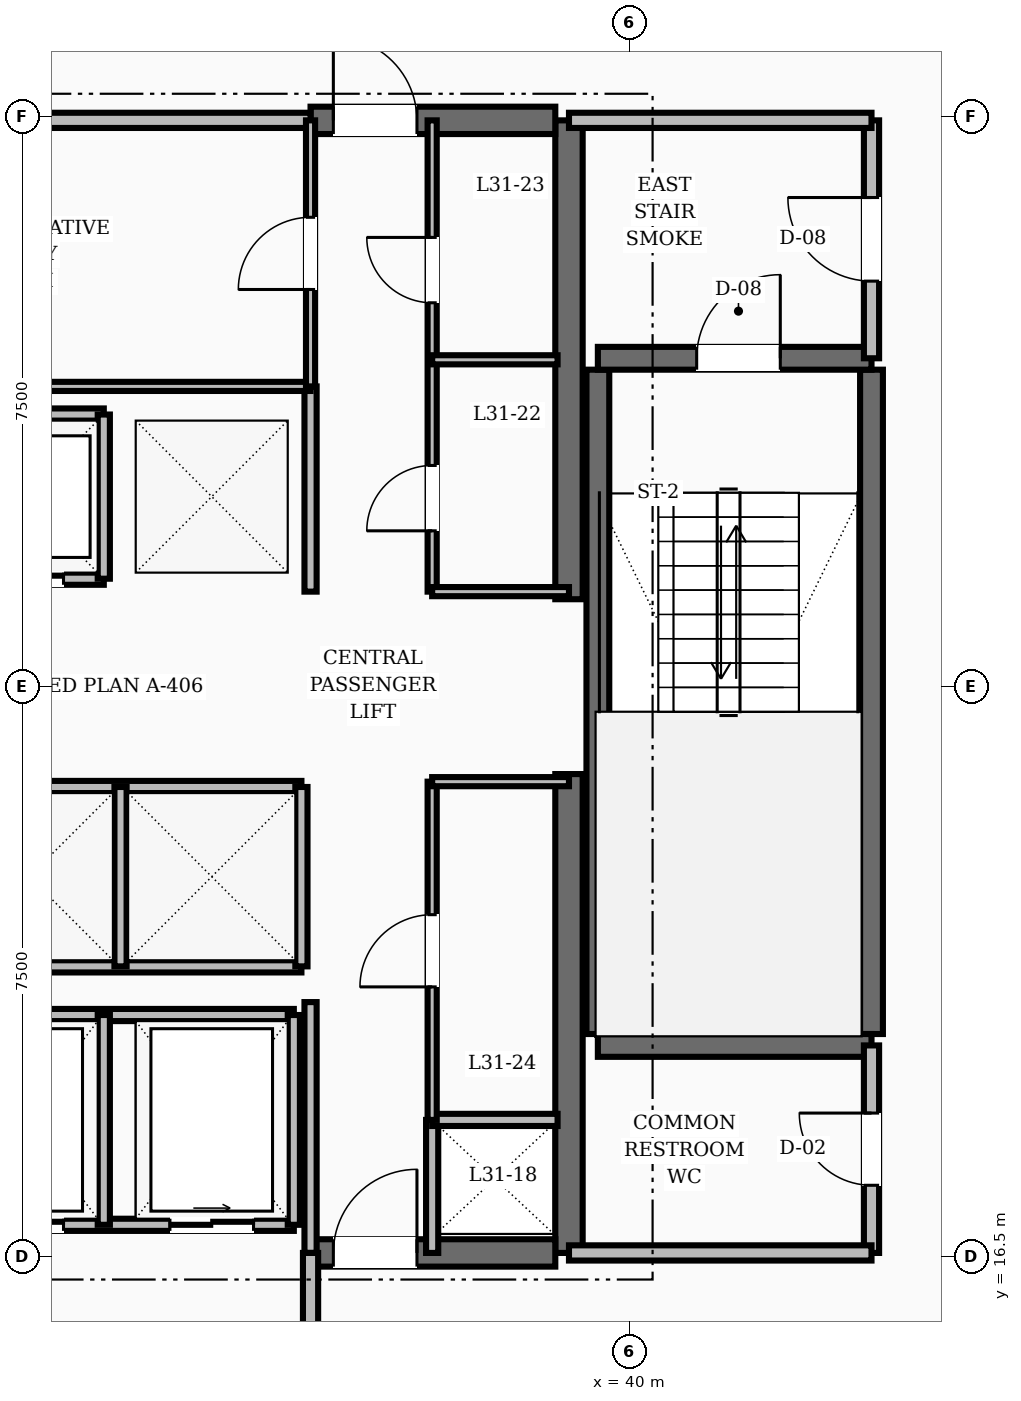
"""IFC4 building model, lengths in metres.
Left out: names, types, materials, properties, quantities, classifications, styles, units other than length and angle.
Written with IfcOpenShell. Run it as: python <this file> out.ifc"""

import sys

from ifc_helpers import new_model, si_unit, direction, frame, frame_2d, origin, place, context, subcontext, project, spatial, rectangle, extrude, element, fill, save


model = new_model("IFC4")
c1 = context("Model", 3, precision=1e-05, world=origin(), true_north=direction((0.0, 1.0)))
c2 = subcontext(c1, "Body", "Model", "MODEL_VIEW")
j1 = project(units=[si_unit("LENGTHUNIT", "METRE"), si_unit("PLANEANGLEUNIT", "RADIAN")], contexts=[c1])
p1 = place(None, origin())
s1 = spatial("IfcSite", under=j1, at=p1, CompositionType="ELEMENT")
p2 = place(p1, origin())
s2 = spatial("IfcBuilding", under=s1, at=p2, CompositionType="ELEMENT")
p3 = place(p2, frame((0.0, 0.0, 124.4)))
s3 = spatial("IfcBuildingStorey", under=s2, at=p3, CompositionType="ELEMENT", Elevation=124.4)
for number, where, z_axis, x_axis in (
    (1, (39.2, 16.55, 0.0), (0.0, 0.0, 1.0), (0.0, 1.0, 0.0)),
    (2, (39.2, 25.15, 0.0), (0.0, 0.0, 1.0), (0.0, 1.0, 0.0)),
):
    element("IfcWall", number, at=place(p3, frame(where, z_axis=z_axis, x_axis=x_axis)), inside=s3, PredefinedType="SHEAR", context=c2, shape_type="SweptSolid", body=[
        extrude(rectangle(XDim=6.3, YDim=0.36, at=frame_2d((3.15, 0.0))), origin(), (0.0, 0.0, 1.0), 3.6),
    ])
p4 = place(p3, frame((35.8, 16.55, 0.0), z_axis=(0.0, 0.0, 1.0), x_axis=(1.0, 0.0, 0.0)))
e3 = element("IfcWall", 3, at=p4, inside=s3, PredefinedType="SHEAR", context=c2, shape_type="SweptSolid", body=[
    extrude(rectangle(XDim=3.22, YDim=0.36, at=frame_2d((1.61, 0.0))), origin(), (0.0, 0.0, 1.0), 3.6),
])
p5 = place(p4, frame((0.3, 0.0, 0.0)))
e4 = element("IfcOpeningElement", 4, at=p5, cuts=e3, PredefinedType="OPENING", context=c2, shape_type="SweptSolid", body=[
    extrude(rectangle(XDim=1.1, YDim=2.1, at=frame_2d((0.55, 1.05))), frame((0.0, 0.19, 0.0), z_axis=(0.0, -1.0, 0.0), x_axis=(1.0, 0.0, 0.0)), (0.0, 0.0, 1.0), 0.38),
])
p6 = place(p3, frame((35.8, 31.45, 0.0), z_axis=(0.0, 0.0, 1.0), x_axis=(1.0, 0.0, 0.0)))
e5 = element("IfcWall", 5, at=p6, inside=s3, PredefinedType="SHEAR", context=c2, shape_type="SweptSolid", body=[
    extrude(rectangle(XDim=3.22, YDim=0.36, at=frame_2d((1.61, 0.0))), origin(), (0.0, 0.0, 1.0), 3.6),
])
p7 = place(p6, frame((0.3, 0.0, 0.0)))
e6 = element("IfcOpeningElement", 6, at=p7, cuts=e5, PredefinedType="OPENING", context=c2, shape_type="SweptSolid", body=[
    extrude(rectangle(XDim=1.1, YDim=2.1, at=frame_2d((0.55, 1.05))), frame((0.0, 0.19, 0.0), z_axis=(0.0, -1.0, 0.0), x_axis=(1.0, 0.0, 0.0)), (0.0, 0.0, 1.0), 0.38),
])
for number, where, z_axis, x_axis in (
    (7, (43.18, 19.43, 0.0), (0.0, 0.0, 1.0), (0.0, 1.0, 0.0)),
    (8, (39.58, 19.43, 0.0), (0.0, 0.0, 1.0), (0.0, 1.0, 0.0)),
):
    element("IfcWall", number, at=place(p3, frame(where, z_axis=z_axis, x_axis=x_axis)), inside=s3, PredefinedType="SHEAR", context=c2, shape_type="SweptSolid", body=[
        extrude(rectangle(XDim=8.74, YDim=0.3, at=frame_2d((4.37, 0.0))), origin(), (0.0, 0.0, 1.0), 3.6),
    ])
p8 = place(p3, frame((39.58, 19.28, 0.0), z_axis=(0.0, 0.0, 1.0), x_axis=(1.0, 0.0, 0.0)))
e9 = element("IfcWall", 9, at=p8, inside=s3, PredefinedType="SHEAR", context=c2, shape_type="SweptSolid", body=[
    extrude(rectangle(XDim=3.6, YDim=0.3, at=frame_2d((1.8, 0.0))), origin(), (0.0, 0.0, 1.0), 3.6),
])
p9 = place(p3, frame((39.58, 28.32, 0.0), z_axis=(0.0, 0.0, 1.0), x_axis=(1.0, 0.0, 0.0)))
e10 = element("IfcWall", 10, at=p9, inside=s3, PredefinedType="SHEAR", context=c2, shape_type="SweptSolid", body=[
    extrude(rectangle(XDim=3.6, YDim=0.3, at=frame_2d((1.8, 0.0))), origin(), (0.0, 0.0, 1.0), 3.6),
])
p10 = place(p9, frame((1.3, 0.0, 0.0)))
e11 = element("IfcOpeningElement", 11, at=p10, cuts=e10, PredefinedType="OPENING", context=c2, shape_type="SweptSolid", body=[
    extrude(rectangle(XDim=1.1, YDim=2.1, at=frame_2d((0.55, 1.05))), frame((0.0, 0.16, 0.0), z_axis=(0.0, -1.0, 0.0), x_axis=(1.0, 0.0, 0.0)), (0.0, 0.0, 1.0), 0.32),
])
p11 = place(p3, frame((43.18, 28.32, 0.0), z_axis=(0.0, 0.0, 1.0), x_axis=(0.0, 1.0, 0.0)))
e12 = element("IfcWall", 12, at=p11, inside=s3, PredefinedType="SOLIDWALL", context=c2, shape_type="SweptSolid", body=[
    extrude(rectangle(XDim=3.13, YDim=0.2, at=frame_2d((1.565, 0.0))), origin(), (0.0, 0.0, 1.0), 2.8),
])
p12 = place(p11, frame((1.015, 0.0, 0.0)))
e13 = element("IfcOpeningElement", 13, at=p12, cuts=e12, PredefinedType="OPENING", context=c2, shape_type="SweptSolid", body=[
    extrude(rectangle(XDim=1.1, YDim=2.1, at=frame_2d((0.55, 1.05))), frame((0.0, 0.11, 0.0), z_axis=(0.0, -1.0, 0.0), x_axis=(1.0, 0.0, 0.0)), (0.0, 0.0, 1.0), 0.22),
])
p13 = place(p3, frame((39.2, 31.45, 0.0), z_axis=(0.0, 0.0, 1.0), x_axis=(1.0, 0.0, 0.0)))
e14 = element("IfcWall", 14, at=p13, inside=s3, PredefinedType="SOLIDWALL", context=c2, shape_type="SweptSolid", body=[
    extrude(rectangle(XDim=3.98, YDim=0.2, at=frame_2d((1.99, 0.0))), origin(), (0.0, 0.0, 1.0), 2.8),
])
p14 = place(p3, frame((43.18, 16.55, 0.0), z_axis=(0.0, 0.0, 1.0), x_axis=(0.0, 1.0, 0.0)))
e15 = element("IfcWall", 15, at=p14, inside=s3, PredefinedType="SOLIDWALL", context=c2, shape_type="SweptSolid", body=[
    extrude(rectangle(XDim=2.73, YDim=0.2, at=frame_2d((1.365, 0.0))), origin(), (0.0, 0.0, 1.0), 2.8),
])
p15 = place(p14, frame((0.89, 0.0, 0.0)))
e16 = element("IfcOpeningElement", 16, at=p15, cuts=e15, PredefinedType="OPENING", context=c2, shape_type="SweptSolid", body=[
    extrude(rectangle(XDim=0.95, YDim=2.1, at=frame_2d((0.475, 1.05))), frame((0.0, 0.11, 0.0), z_axis=(0.0, -1.0, 0.0), x_axis=(1.0, 0.0, 0.0)), (0.0, 0.0, 1.0), 0.22),
])
p16 = place(p3, frame((39.2, 16.55, 0.0), z_axis=(0.0, 0.0, 1.0), x_axis=(1.0, 0.0, 0.0)))
e17 = element("IfcWall", 17, at=p16, inside=s3, PredefinedType="SOLIDWALL", context=c2, shape_type="SweptSolid", body=[
    extrude(rectangle(XDim=3.98, YDim=0.2, at=frame_2d((1.99, 0.0))), origin(), (0.0, 0.0, 1.0), 2.8),
])
p17 = place(p3, frame((35.8, 16.55, 0.0), z_axis=(0.0, 0.0, 1.0), x_axis=(0.0, 1.0, 0.0)))
e18 = element("IfcWall", 18, at=p17, inside=s3, PredefinedType="SOLIDWALL", context=c2, shape_type="SweptSolid", body=[
    extrude(rectangle(XDim=3.3, YDim=0.16, at=frame_2d((1.65, 0.0))), origin(), (0.0, 0.0, 1.0), 2.8),
])
p18 = place(p3, frame((37.4, 16.55, 0.0), z_axis=(0.0, 0.0, 1.0), x_axis=(0.0, 1.0, 0.0)))
e19 = element("IfcWall", 19, at=p18, inside=s3, PredefinedType="SOLIDWALL", context=c2, shape_type="SweptSolid", body=[
    extrude(rectangle(XDim=1.75, YDim=0.16, at=frame_2d((0.875, 0.0))), origin(), (0.0, 0.0, 1.0), 2.8),
])
p19 = place(p3, frame((35.8, 25.25, 0.0), z_axis=(0.0, 0.0, 1.0), x_axis=(0.0, 1.0, 0.0)))
e20 = element("IfcWall", 20, at=p19, inside=s3, PredefinedType="SOLIDWALL", context=c2, shape_type="SweptSolid", body=[
    extrude(rectangle(XDim=2.7, YDim=0.16, at=frame_2d((1.35, 0.0))), origin(), (0.0, 0.0, 1.0), 2.8),
])
p20 = place(p3, frame((35.8, 14.35, 0.0), z_axis=(0.0, 0.0, 1.0), x_axis=(0.0, 1.0, 0.0)))
e21 = element("IfcWall", 21, at=p20, inside=s3, PredefinedType="SOLIDWALL", context=c2, shape_type="SweptSolid", body=[
    extrude(rectangle(XDim=2.2, YDim=0.2, at=frame_2d((1.1, 0.0))), origin(), (0.0, 0.0, 1.0), 2.8),
])
p21 = place(p3, frame((28.42, 25.42, 0.0), z_axis=(0.0, 0.0, 1.0), x_axis=(1.0, 0.0, 0.0)))
e22 = element("IfcWall", 22, at=p21, inside=s3, PredefinedType="SOLIDWALL", context=c2, shape_type="SweptSolid", body=[
    extrude(rectangle(XDim=4.66, YDim=0.16, at=frame_2d((2.33, 0.0))), origin(), (0.0, 0.0, 1.0), 2.8),
])
p22 = place(p21, frame((0.53, 0.0, 0.0)))
e23 = element("IfcOpeningElement", 23, at=p22, cuts=e22, PredefinedType="OPENING", context=c2, shape_type="SweptSolid", body=[
    extrude(rectangle(XDim=1.1, YDim=2.15, at=frame_2d((0.55, 1.075))), frame((0.0, 0.09, 0.0), z_axis=(0.0, -1.0, 0.0), x_axis=(1.0, 0.0, 0.0)), (0.0, 0.0, 1.0), 0.18),
])
p23 = place(p21, frame((3.03, 0.0, 0.0)))
e24 = element("IfcOpeningElement", 24, at=p23, cuts=e22, PredefinedType="OPENING", context=c2, shape_type="SweptSolid", body=[
    extrude(rectangle(XDim=1.1, YDim=2.15, at=frame_2d((0.55, 1.075))), frame((0.0, 0.09, 0.0), z_axis=(0.0, -1.0, 0.0), x_axis=(1.0, 0.0, 0.0)), (0.0, 0.0, 1.0), 0.18),
])
p24 = place(p3, frame((28.42, 27.58, 0.0), z_axis=(0.0, 0.0, 1.0), x_axis=(1.0, 0.0, 0.0)))
e25 = element("IfcWall", 25, at=p24, inside=s3, PredefinedType="SOLIDWALL", context=c2, shape_type="SweptSolid", body=[
    extrude(rectangle(XDim=4.66, YDim=0.16, at=frame_2d((2.33, 0.0))), origin(), (0.0, 0.0, 1.0), 2.8),
])
p25 = place(p3, frame((33.08, 25.42, 0.0), z_axis=(0.0, 0.0, 1.0), x_axis=(0.0, 1.0, 0.0)))
e26 = element("IfcWall", 26, at=p25, inside=s3, PredefinedType="SOLIDWALL", context=c2, shape_type="SweptSolid", body=[
    extrude(rectangle(XDim=2.16, YDim=0.16, at=frame_2d((1.08, 0.0))), origin(), (0.0, 0.0, 1.0), 2.8),
])
for number, where, z_axis, x_axis in (
    (27, (30.92, 22.68, 0.0), (0.0, 0.0, 1.0), (1.0, 0.0, 0.0)),
    (28, (30.92, 20.32, 0.0), (0.0, 0.0, 1.0), (1.0, 0.0, 0.0)),
):
    element("IfcWall", number, at=place(p3, frame(where, z_axis=z_axis, x_axis=x_axis)), inside=s3, PredefinedType="SOLIDWALL", context=c2, shape_type="SweptSolid", body=[
        extrude(rectangle(XDim=4.76, YDim=0.16, at=frame_2d((2.38, 0.0))), origin(), (0.0, 0.0, 1.0), 2.8),
    ])
for number, where, z_axis, x_axis in (
    (29, (33.3, 20.32, 0.0), (0.0, 0.0, 1.0), (0.0, 1.0, 0.0)),
    (30, (35.68, 20.32, 0.0), (0.0, 0.0, 1.0), (0.0, 1.0, 0.0)),
):
    element("IfcWall", number, at=place(p3, frame(where, z_axis=z_axis, x_axis=x_axis)), inside=s3, PredefinedType="SOLIDWALL", context=c2, shape_type="SweptSolid", body=[
        extrude(rectangle(XDim=2.36, YDim=0.16, at=frame_2d((1.18, 0.0))), origin(), (0.0, 0.0, 1.0), 2.8),
    ])
p26 = place(p3, frame((28.42, 16.92, 0.0), z_axis=(0.0, 0.0, 1.0), x_axis=(1.0, 0.0, 0.0)))
e31 = element("IfcWall", 31, at=p26, inside=s3, PredefinedType="SOLIDWALL", context=c2, shape_type="SweptSolid", body=[
    extrude(rectangle(XDim=7.16, YDim=0.16, at=frame_2d((3.58, 0.0))), origin(), (0.0, 0.0, 1.0), 2.8),
])
p27 = place(p26, frame((0.53, 0.0, 0.0)))
e32 = element("IfcOpeningElement", 32, at=p27, cuts=e31, PredefinedType="OPENING", context=c2, shape_type="SweptSolid", body=[
    extrude(rectangle(XDim=1.1, YDim=2.15, at=frame_2d((0.55, 1.075))), frame((0.0, 0.09, 0.0), z_axis=(0.0, -1.0, 0.0), x_axis=(1.0, 0.0, 0.0)), (0.0, 0.0, 1.0), 0.18),
])
p28 = place(p26, frame((3.03, 0.0, 0.0)))
e33 = element("IfcOpeningElement", 33, at=p28, cuts=e31, PredefinedType="OPENING", context=c2, shape_type="SweptSolid", body=[
    extrude(rectangle(XDim=1.1, YDim=2.15, at=frame_2d((0.55, 1.075))), frame((0.0, 0.09, 0.0), z_axis=(0.0, -1.0, 0.0), x_axis=(1.0, 0.0, 0.0)), (0.0, 0.0, 1.0), 0.18),
])
p29 = place(p26, frame((5.53, 0.0, 0.0)))
e34 = element("IfcOpeningElement", 34, at=p29, cuts=e31, PredefinedType="OPENING", context=c2, shape_type="SweptSolid", body=[
    extrude(rectangle(XDim=1.1, YDim=2.15, at=frame_2d((0.55, 1.075))), frame((0.0, 0.09, 0.0), z_axis=(0.0, -1.0, 0.0), x_axis=(1.0, 0.0, 0.0)), (0.0, 0.0, 1.0), 0.18),
])
p30 = place(p3, frame((28.42, 19.68, 0.0), z_axis=(0.0, 0.0, 1.0), x_axis=(1.0, 0.0, 0.0)))
e35 = element("IfcWall", 35, at=p30, inside=s3, PredefinedType="SOLIDWALL", context=c2, shape_type="SweptSolid", body=[
    extrude(rectangle(XDim=7.16, YDim=0.16, at=frame_2d((3.58, 0.0))), origin(), (0.0, 0.0, 1.0), 2.8),
])
for number, where, z_axis, x_axis in (
    (36, (33.08, 16.92, 0.0), (0.0, 0.0, 1.0), (0.0, 1.0, 0.0)),
    (37, (35.58, 16.92, 0.0), (0.0, 0.0, 1.0), (0.0, 1.0, 0.0)),
):
    element("IfcWall", number, at=place(p3, frame(where, z_axis=z_axis, x_axis=x_axis)), inside=s3, PredefinedType="SOLIDWALL", context=c2, shape_type="SweptSolid", body=[
        extrude(rectangle(XDim=2.76, YDim=0.16, at=frame_2d((1.38, 0.0))), origin(), (0.0, 0.0, 1.0), 2.8),
    ])
p31 = place(p3, frame((28.2, 31.45, 0.0), z_axis=(0.0, 0.0, 1.0), x_axis=(1.0, 0.0, 0.0)))
e38 = element("IfcWall", 38, at=p31, inside=s3, PredefinedType="SOLIDWALL", context=c2, shape_type="SweptSolid", body=[
    extrude(rectangle(XDim=7.6, YDim=0.2, at=frame_2d((3.8, 0.0))), origin(), (0.0, 0.0, 1.0), 2.8),
])
p32 = place(p3, frame((28.2, 27.95, 0.0), z_axis=(0.0, 0.0, 1.0), x_axis=(1.0, 0.0, 0.0)))
e39 = element("IfcWall", 39, at=p32, inside=s3, PredefinedType="PARTITIONING", context=c2, shape_type="SweptSolid", body=[
    extrude(rectangle(XDim=7.6, YDim=0.12, at=frame_2d((3.8, 0.0))), origin(), (0.0, 0.0, 1.0), 2.8),
])
p33 = place(p3, frame((35.8, 27.95, 0.0), z_axis=(0.0, 0.0, 1.0), x_axis=(0.0, 1.0, 0.0)))
e40 = element("IfcWall", 40, at=p33, inside=s3, PredefinedType="PARTITIONING", context=c2, shape_type="SweptSolid", body=[
    extrude(rectangle(XDim=3.5, YDim=0.12, at=frame_2d((1.75, 0.0))), origin(), (0.0, 0.0, 1.0), 2.8),
])
p34 = place(p33, frame((1.275, 0.0, 0.0)))
e41 = element("IfcOpeningElement", 41, at=p34, cuts=e40, PredefinedType="OPENING", context=c2, shape_type="SweptSolid", body=[
    extrude(rectangle(XDim=0.95, YDim=2.1, at=frame_2d((0.475, 1.05))), frame((0.0, 0.07, 0.0), z_axis=(0.0, -1.0, 0.0), x_axis=(1.0, 0.0, 0.0)), (0.0, 0.0, 1.0), 0.14),
])
p35 = place(p3, frame((37.4, 18.3, 0.0), z_axis=(0.0, 0.0, 1.0), x_axis=(1.0, 0.0, 0.0)))
e42 = element("IfcWall", 42, at=p35, inside=s3, PredefinedType="SOLIDWALL", context=c2, shape_type="SweptSolid", body=[
    extrude(rectangle(XDim=1.65, YDim=0.16, at=frame_2d((0.825, 0.0))), origin(), (0.0, 0.0, 1.0), 2.8),
])
p36 = place(p3, frame((37.4, 25.25, 0.0), z_axis=(0.0, 0.0, 1.0), x_axis=(0.0, 1.0, 0.0)))
e43 = element("IfcWall", 43, at=p36, inside=s3, PredefinedType="PARTITIONING", context=c2, shape_type="SweptSolid", body=[
    extrude(rectangle(XDim=6.2, YDim=0.12, at=frame_2d((3.1, 0.0))), origin(), (0.0, 0.0, 1.0), 2.8),
])
p37 = place(p36, frame((0.8, 0.0, 0.0)))
e44 = element("IfcOpeningElement", 44, at=p37, cuts=e43, PredefinedType="OPENING", context=c2, shape_type="SweptSolid", body=[
    extrude(rectangle(XDim=0.86, YDim=2.1, at=frame_2d((0.43, 1.05))), frame((0.0, 0.07, 0.0), z_axis=(0.0, -1.0, 0.0), x_axis=(1.0, 0.0, 0.0)), (0.0, 0.0, 1.0), 0.14),
])
p38 = place(p36, frame((3.8, 0.0, 0.0)))
e45 = element("IfcOpeningElement", 45, at=p38, cuts=e43, PredefinedType="OPENING", context=c2, shape_type="SweptSolid", body=[
    extrude(rectangle(XDim=0.86, YDim=2.1, at=frame_2d((0.43, 1.05))), frame((0.0, 0.07, 0.0), z_axis=(0.0, -1.0, 0.0), x_axis=(1.0, 0.0, 0.0)), (0.0, 0.0, 1.0), 0.14),
])
p39 = place(p3, frame((37.4, 25.25, 0.0), z_axis=(0.0, 0.0, 1.0), x_axis=(1.0, 0.0, 0.0)))
e46 = element("IfcWall", 46, at=p39, inside=s3, PredefinedType="PARTITIONING", context=c2, shape_type="SweptSolid", body=[
    extrude(rectangle(XDim=1.8, YDim=0.12, at=frame_2d((0.9, 0.0))), origin(), (0.0, 0.0, 1.0), 2.8),
])
p40 = place(p3, frame((37.4, 18.3, 0.0), z_axis=(0.0, 0.0, 1.0), x_axis=(0.0, 1.0, 0.0)))
e47 = element("IfcWall", 47, at=p40, inside=s3, PredefinedType="PARTITIONING", context=c2, shape_type="SweptSolid", body=[
    extrude(rectangle(XDim=4.45, YDim=0.12, at=frame_2d((2.225, 0.0))), origin(), (0.0, 0.0, 1.0), 2.8),
])
p41 = place(p40, frame((1.75, 0.0, 0.0)))
e48 = element("IfcOpeningElement", 48, at=p41, cuts=e47, PredefinedType="OPENING", context=c2, shape_type="SweptSolid", body=[
    extrude(rectangle(XDim=0.95, YDim=2.1, at=frame_2d((0.475, 1.05))), frame((0.0, 0.07, 0.0), z_axis=(0.0, -1.0, 0.0), x_axis=(1.0, 0.0, 0.0)), (0.0, 0.0, 1.0), 0.14),
])
p42 = place(p3, frame((37.4, 22.75, 0.0), z_axis=(0.0, 0.0, 1.0), x_axis=(1.0, 0.0, 0.0)))
e49 = element("IfcWall", 49, at=p42, inside=s3, PredefinedType="PARTITIONING", context=c2, shape_type="SweptSolid", body=[
    extrude(rectangle(XDim=1.8, YDim=0.12, at=frame_2d((0.9, 0.0))), origin(), (0.0, 0.0, 1.0), 2.8),
])
p43 = place(p3, frame((37.4, 28.3, 0.0), z_axis=(0.0, 0.0, 1.0), x_axis=(1.0, 0.0, 0.0)))
e50 = element("IfcWall", 50, at=p43, inside=s3, PredefinedType="PARTITIONING", context=c2, shape_type="SweptSolid", body=[
    extrude(rectangle(XDim=1.65, YDim=0.12, at=frame_2d((0.825, 0.0))), origin(), (0.0, 0.0, 1.0), 2.8),
])
p44 = place(p10, origin())
e51 = element("IfcDoor", 51, at=p44, inside=s3, OperationType="SINGLE_SWING_RIGHT", PredefinedType="DOOR", context=c2, shape_type="SweptSolid", body=[
    extrude(rectangle(XDim=1.1, YDim=2.1, at=frame_2d((0.55, 1.05))), frame((0.0, 0.025, 0.0), z_axis=(0.0, -1.0, 0.0), x_axis=(1.0, 0.0, 0.0)), (0.0, 0.0, 1.0), 0.05),
])
fill(e11, e51)
p45 = place(p12, origin())
e52 = element("IfcDoor", 52, at=p45, inside=s3, OperationType="SINGLE_SWING_RIGHT", PredefinedType="DOOR", context=c2, shape_type="SweptSolid", body=[
    extrude(rectangle(XDim=1.1, YDim=2.1, at=frame_2d((0.55, 1.05))), frame((0.0, 0.025, 0.0), z_axis=(0.0, -1.0, 0.0), x_axis=(1.0, 0.0, 0.0)), (0.0, 0.0, 1.0), 0.05),
])
fill(e13, e52)
p46 = place(p15, origin())
e53 = element("IfcDoor", 53, at=p46, inside=s3, OperationType="SINGLE_SWING_RIGHT", PredefinedType="DOOR", context=c2, shape_type="SweptSolid", body=[
    extrude(rectangle(XDim=0.95, YDim=2.1, at=frame_2d((0.475, 1.05))), frame((0.0, 0.025, 0.0), z_axis=(0.0, -1.0, 0.0), x_axis=(1.0, 0.0, 0.0)), (0.0, 0.0, 1.0), 0.05),
])
fill(e16, e53)
p47 = place(p7, origin())
e54 = element("IfcDoor", 54, at=p47, inside=s3, OperationType="SINGLE_SWING_LEFT", PredefinedType="DOOR", context=c2, shape_type="SweptSolid", body=[
    extrude(rectangle(XDim=1.1, YDim=2.1, at=frame_2d((0.55, 1.05))), frame((0.0, 0.025, 0.0), z_axis=(0.0, -1.0, 0.0), x_axis=(1.0, 0.0, 0.0)), (0.0, 0.0, 1.0), 0.05),
])
fill(e6, e54)
p48 = place(p5, origin())
e55 = element("IfcDoor", 55, at=p48, inside=s3, OperationType="SINGLE_SWING_RIGHT", PredefinedType="DOOR", context=c2, shape_type="SweptSolid", body=[
    extrude(rectangle(XDim=1.1, YDim=2.1, at=frame_2d((0.55, 1.05))), frame((0.0, 0.025, 0.0), z_axis=(0.0, -1.0, 0.0), x_axis=(1.0, 0.0, 0.0)), (0.0, 0.0, 1.0), 0.05),
])
fill(e4, e55)
p49 = place(p23, origin())
e56 = element("IfcDoor", 56, at=p49, inside=s3, OperationType="SLIDING_TO_RIGHT", PredefinedType="DOOR", context=c2, shape_type="SweptSolid", body=[
    extrude(rectangle(XDim=1.1, YDim=2.15, at=frame_2d((0.55, 1.075))), frame((0.0, 0.025, 0.0), z_axis=(0.0, -1.0, 0.0), x_axis=(1.0, 0.0, 0.0)), (0.0, 0.0, 1.0), 0.05),
])
fill(e24, e56)
p50 = place(p28, origin())
e57 = element("IfcDoor", 57, at=p50, inside=s3, OperationType="SLIDING_TO_RIGHT", PredefinedType="DOOR", context=c2, shape_type="SweptSolid", body=[
    extrude(rectangle(XDim=1.1, YDim=2.15, at=frame_2d((0.55, 1.075))), frame((0.0, 0.025, 0.0), z_axis=(0.0, -1.0, 0.0), x_axis=(1.0, 0.0, 0.0)), (0.0, 0.0, 1.0), 0.05),
])
fill(e33, e57)
p51 = place(p29, origin())
e58 = element("IfcDoor", 58, at=p51, inside=s3, OperationType="SLIDING_TO_RIGHT", PredefinedType="DOOR", context=c2, shape_type="SweptSolid", body=[
    extrude(rectangle(XDim=1.1, YDim=2.15, at=frame_2d((0.55, 1.075))), frame((0.0, 0.025, 0.0), z_axis=(0.0, -1.0, 0.0), x_axis=(1.0, 0.0, 0.0)), (0.0, 0.0, 1.0), 0.05),
])
fill(e34, e58)
p52 = place(p34, origin())
e59 = element("IfcDoor", 59, at=p52, inside=s3, OperationType="SINGLE_SWING_LEFT", PredefinedType="DOOR", context=c2, shape_type="SweptSolid", body=[
    extrude(rectangle(XDim=0.95, YDim=2.1, at=frame_2d((0.475, 1.05))), frame((0.0, 0.025, 0.0), z_axis=(0.0, -1.0, 0.0), x_axis=(1.0, 0.0, 0.0)), (0.0, 0.0, 1.0), 0.05),
])
fill(e41, e59)
p53 = place(p37, origin())
e60 = element("IfcDoor", 60, at=p53, inside=s3, OperationType="SINGLE_SWING_LEFT", PredefinedType="DOOR", context=c2, shape_type="SweptSolid", body=[
    extrude(rectangle(XDim=0.86, YDim=2.1, at=frame_2d((0.43, 1.05))), frame((0.0, 0.025, 0.0), z_axis=(0.0, -1.0, 0.0), x_axis=(1.0, 0.0, 0.0)), (0.0, 0.0, 1.0), 0.05),
])
fill(e44, e60)
p54 = place(p38, origin())
e61 = element("IfcDoor", 61, at=p54, inside=s3, OperationType="SINGLE_SWING_RIGHT", PredefinedType="DOOR", context=c2, shape_type="SweptSolid", body=[
    extrude(rectangle(XDim=0.86, YDim=2.1, at=frame_2d((0.43, 1.05))), frame((0.0, 0.025, 0.0), z_axis=(0.0, -1.0, 0.0), x_axis=(1.0, 0.0, 0.0)), (0.0, 0.0, 1.0), 0.05),
])
fill(e45, e61)
p55 = place(p41, origin())
e62 = element("IfcDoor", 62, at=p55, inside=s3, OperationType="SINGLE_SWING_LEFT", PredefinedType="DOOR", context=c2, shape_type="SweptSolid", body=[
    extrude(rectangle(XDim=0.95, YDim=2.1, at=frame_2d((0.475, 1.05))), frame((0.0, 0.025, 0.0), z_axis=(0.0, -1.0, 0.0), x_axis=(1.0, 0.0, 0.0)), (0.0, 0.0, 1.0), 0.05),
])
fill(e48, e62)
save(model, sys.argv[1])
